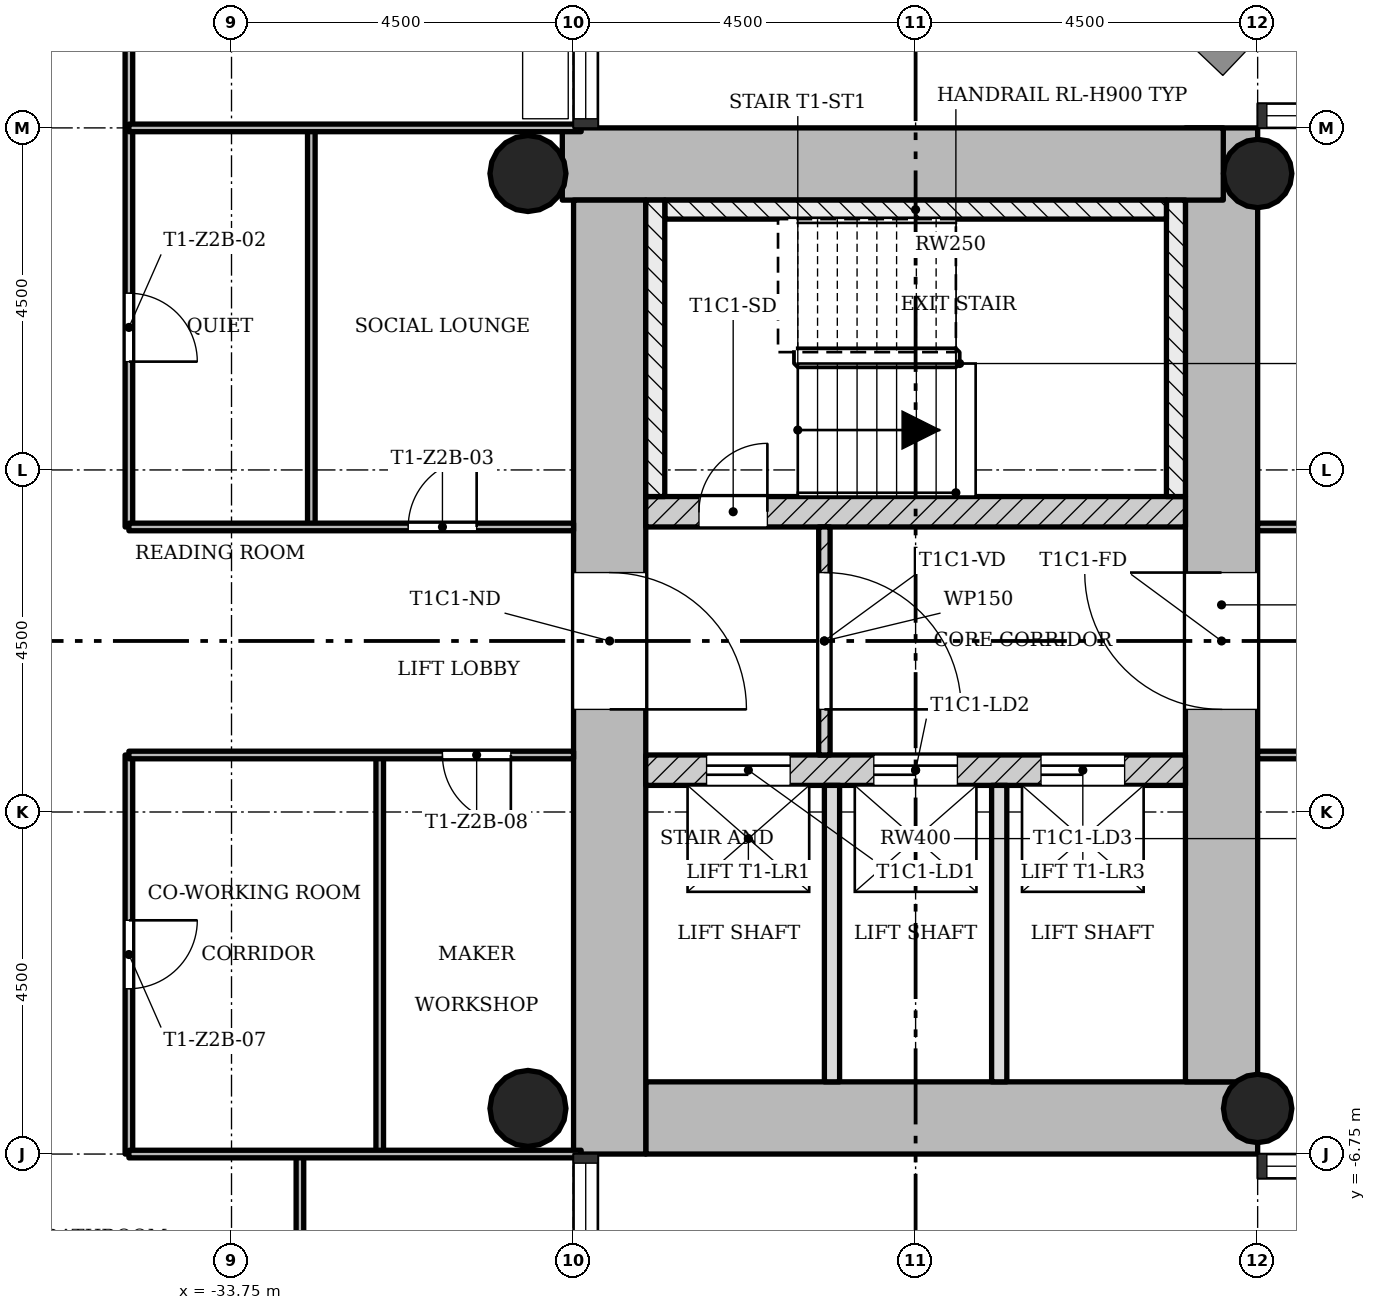
"""IFC4 building model, lengths in metres.
Left out: names, types, materials, properties, quantities, classifications, styles, units other than length and angle.
Written with IfcOpenShell. Run it as: python <this file> out.ifc"""

import sys

from ifc_helpers import new_model, si_unit, direction, frame, frame_2d, origin, origin_2d, place, context, subcontext, project, spatial, rectangle, hollow_circle, extrude, element, fill, save


model = new_model("IFC4")
c1 = context("Model", 3, precision=1e-05, world=origin(), true_north=direction((0.0, 1.0)))
c2 = subcontext(c1, "Body", "Model", "MODEL_VIEW")
j1 = project(units=[si_unit("LENGTHUNIT", "METRE"), si_unit("PLANEANGLEUNIT", "RADIAN")], contexts=[c1])
p1 = place(None, origin())
s1 = spatial("IfcSite", under=j1, at=p1, CompositionType="ELEMENT")
p2 = place(p1, origin())
s2 = spatial("IfcBuilding", under=s1, at=p2, CompositionType="ELEMENT")
p3 = place(p2, frame((0.0, 0.0, 80.0)))
s3 = spatial("IfcBuildingStorey", under=s2, at=p3, CompositionType="ELEMENT", Elevation=80.0)
p4 = place(p3, frame((-28.3, -6.275, 0.0), z_axis=(0.0, 0.0, 1.0), x_axis=(1.0, 0.0, 0.0)))
e1 = element("IfcWall", 1, at=p4, inside=s3, PredefinedType="SHEAR", context=c2, shape_type="SweptSolid", body=[
    extrude(rectangle(XDim=8.05, YDim=0.95, at=frame_2d((4.025, 0.0))), origin(), (0.0, 0.0, 1.0), 3.4),
])
p5 = place(p3, frame((-20.725, -5.8, 0.0), z_axis=(0.0, 0.0, 1.0), x_axis=(0.0, 1.0, 0.0)))
e2 = element("IfcWall", 2, at=p5, inside=s3, PredefinedType="SHEAR", context=c2, shape_type="SweptSolid", body=[
    extrude(rectangle(XDim=12.55, YDim=0.95, at=frame_2d((6.275, 0.0))), origin(), (0.0, 0.0, 1.0), 3.4),
])
p6 = place(p5, frame((4.9, 0.0, 0.0)))
e3 = element("IfcOpeningElement", 3, at=p6, cuts=e2, PredefinedType="OPENING", context=c2, shape_type="SweptSolid", body=[
    extrude(rectangle(XDim=1.8, YDim=2.1, at=frame_2d((0.9, 1.05))), frame((0.0, 0.485, 0.0), z_axis=(0.0, -1.0, 0.0), x_axis=(1.0, 0.0, 0.0)), (0.0, 0.0, 1.0), 0.97),
])
p7 = place(p3, frame((-20.702, 6.275, 0.0), z_axis=(0.0, 0.0, 1.0), x_axis=(-1.0, 0.0, 0.0)))
e4 = element("IfcWall", 4, at=p7, inside=s3, PredefinedType="SHEAR", context=c2, shape_type="SweptSolid", body=[
    extrude(rectangle(XDim=8.696, YDim=0.95, at=frame_2d((4.348, 0.0))), origin(), (0.0, 0.0, 1.0), 3.4),
])
p8 = place(p3, frame((-28.775, 5.8, 0.0), z_axis=(0.0, 0.0, 1.0), x_axis=(0.0, -1.0, 0.0)))
e5 = element("IfcWall", 5, at=p8, inside=s3, PredefinedType="SHEAR", context=c2, shape_type="SweptSolid", body=[
    extrude(rectangle(XDim=12.55, YDim=0.95, at=frame_2d((6.275, 0.0))), origin(), (0.0, 0.0, 1.0), 3.4),
])
p9 = place(p8, frame((4.9, 0.0, 0.0)))
e6 = element("IfcOpeningElement", 6, at=p9, cuts=e5, PredefinedType="OPENING", context=c2, shape_type="SweptSolid", body=[
    extrude(rectangle(XDim=1.8, YDim=2.1, at=frame_2d((0.9, 1.05))), frame((0.0, 0.485, 0.0), z_axis=(0.0, -1.0, 0.0), x_axis=(1.0, 0.0, 0.0)), (0.0, 0.0, 1.0), 0.97),
])
p10 = place(p3, frame((-28.3, -1.7, 0.0), z_axis=(0.0, 0.0, 1.0), x_axis=(1.0, 0.0, 0.0)))
e7 = element("IfcWall", 7, at=p10, inside=s3, PredefinedType="SHEAR", context=c2, shape_type="SweptSolid", body=[
    extrude(rectangle(XDim=7.1, YDim=0.4, at=frame_2d((3.55, 0.0))), origin(), (0.0, 0.0, 1.0), 3.4),
])
p11 = place(p10, frame((0.8, 0.0, 0.0)))
e8 = element("IfcOpeningElement", 8, at=p11, cuts=e7, PredefinedType="OPENING", context=c2, shape_type="SweptSolid", body=[
    extrude(rectangle(XDim=1.1, YDim=2.1, at=frame_2d((0.55, 1.05))), frame((0.0, 0.21, 0.0), z_axis=(0.0, -1.0, 0.0), x_axis=(1.0, 0.0, 0.0)), (0.0, 0.0, 1.0), 0.42),
])
p12 = place(p10, frame((3.0, 0.0, 0.0)))
e9 = element("IfcOpeningElement", 9, at=p12, cuts=e7, PredefinedType="OPENING", context=c2, shape_type="SweptSolid", body=[
    extrude(rectangle(XDim=1.1, YDim=2.1, at=frame_2d((0.55, 1.05))), frame((0.0, 0.21, 0.0), z_axis=(0.0, -1.0, 0.0), x_axis=(1.0, 0.0, 0.0)), (0.0, 0.0, 1.0), 0.42),
])
p13 = place(p10, frame((5.2, 0.0, 0.0)))
e10 = element("IfcOpeningElement", 10, at=p13, cuts=e7, PredefinedType="OPENING", context=c2, shape_type="SweptSolid", body=[
    extrude(rectangle(XDim=1.1, YDim=2.1, at=frame_2d((0.55, 1.05))), frame((0.0, 0.21, 0.0), z_axis=(0.0, -1.0, 0.0), x_axis=(1.0, 0.0, 0.0)), (0.0, 0.0, 1.0), 0.42),
])
p14 = place(p3, frame((-28.3, 1.7, 0.0), z_axis=(0.0, 0.0, 1.0), x_axis=(1.0, 0.0, 0.0)))
e11 = element("IfcWall", 11, at=p14, inside=s3, PredefinedType="SHEAR", context=c2, shape_type="SweptSolid", body=[
    extrude(rectangle(XDim=7.1, YDim=0.4, at=frame_2d((3.55, 0.0))), origin(), (0.0, 0.0, 1.0), 3.4),
])
p15 = place(p14, frame((0.7, 0.0, 0.0)))
e12 = element("IfcOpeningElement", 12, at=p15, cuts=e11, PredefinedType="OPENING", context=c2, shape_type="SweptSolid", body=[
    extrude(rectangle(XDim=0.9, YDim=2.1, at=frame_2d((0.45, 1.05))), frame((0.0, 0.21, 0.0), z_axis=(0.0, -1.0, 0.0), x_axis=(1.0, 0.0, 0.0)), (0.0, 0.0, 1.0), 0.42),
])
for number, where, z_axis, x_axis in (
    (13, (-20.25, -6.15, 0.0), (0.0, 0.0, 1.0), (1.0, 0.0, 0.0)),
    (14, (-20.25, 6.15, 0.0), (0.0, 0.0, 1.0), (1.0, 0.0, 0.0)),
):
    element("IfcColumn", number, at=place(p3, frame(where, z_axis=z_axis, x_axis=x_axis)), inside=s3, PredefinedType="COLUMN", context=c2, shape_type="SweptSolid", body=[
        extrude(hollow_circle(Radius=0.45, WallThickness=0.032, at=origin_2d()), origin(), (0.0, 0.0, 1.0), 3.4),
    ])
for number, where, z_axis, x_axis in (
    (15, (-29.85, -6.15, 0.0), (0.0, 0.0, 1.0), (1.0, 0.0, 0.0)),
    (16, (-29.85, 6.15, 0.0), (0.0, 0.0, 1.0), (1.0, 0.0, 0.0)),
):
    element("IfcColumn", number, at=place(p3, frame(where, z_axis=z_axis, x_axis=x_axis)), inside=s3, PredefinedType="COLUMN", context=c2, shape_type="SweptSolid", body=[
        extrude(hollow_circle(Radius=0.5, WallThickness=0.036, at=origin_2d()), origin(), (0.0, 0.0, 1.0), 3.4),
    ])
p16 = place(p3, frame((-25.95, -1.5, 0.0), z_axis=(0.0, 0.0, 1.0), x_axis=(0.0, 1.0, 0.0)))
e17 = element("IfcWall", 17, at=p16, inside=s3, PredefinedType="PARTITIONING", context=c2, shape_type="SweptSolid", body=[
    extrude(rectangle(XDim=3.0, YDim=0.15, at=frame_2d((1.5, 0.0))), origin(), (0.0, 0.0, 1.0), 3.0),
])
p17 = place(p16, frame((0.6, 0.0, 0.0)))
e18 = element("IfcOpeningElement", 18, at=p17, cuts=e17, PredefinedType="OPENING", context=c2, shape_type="SweptSolid", body=[
    extrude(rectangle(XDim=1.8, YDim=2.1, at=frame_2d((0.9, 1.05))), frame((0.0, 0.085, 0.0), z_axis=(0.0, -1.0, 0.0), x_axis=(1.0, 0.0, 0.0)), (0.0, 0.0, 1.0), 0.17),
])
for number, where, z_axis, x_axis in (
    (19, (-25.85, -5.8, 0.0), (0.0, 0.0, 1.0), (0.0, 1.0, 0.0)),
    (20, (-23.65, -5.8, 0.0), (0.0, 0.0, 1.0), (0.0, 1.0, 0.0)),
):
    element("IfcWall", number, at=place(p3, frame(where, z_axis=z_axis, x_axis=x_axis)), inside=s3, PredefinedType="SOLIDWALL", context=c2, shape_type="SweptSolid", body=[
        extrude(rectangle(XDim=3.9, YDim=0.2, at=frame_2d((1.95, 0.0))), origin(), (0.0, 0.0, 1.0), 3.0),
    ])
p18 = place(p3, frame((-35.1, -6.75, 0.0), z_axis=(0.0, 0.0, 1.0), x_axis=(0.0, 1.0, 0.0)))
e21 = element("IfcWall", 21, at=p18, inside=s3, PredefinedType="PARTITIONING", context=c2, shape_type="SweptSolid", body=[
    extrude(rectangle(XDim=5.25, YDim=0.1, at=frame_2d((2.625, 0.0))), origin(), (0.0, 0.0, 1.0), 3.0),
])
p19 = place(p18, frame((2.175, 0.0, 0.0)))
e22 = element("IfcOpeningElement", 22, at=p19, cuts=e21, PredefinedType="OPENING", context=c2, shape_type="SweptSolid", body=[
    extrude(rectangle(XDim=0.9, YDim=2.1, at=frame_2d((0.45, 1.05))), frame((0.0, 0.06, 0.0), z_axis=(0.0, -1.0, 0.0), x_axis=(1.0, 0.0, 0.0)), (0.0, 0.0, 1.0), 0.12),
])
p20 = place(p3, frame((-35.1, 1.5, 0.0), z_axis=(0.0, 0.0, 1.0), x_axis=(0.0, 1.0, 0.0)))
e23 = element("IfcWall", 23, at=p20, inside=s3, PredefinedType="PARTITIONING", context=c2, shape_type="SweptSolid", body=[
    extrude(rectangle(XDim=9.75, YDim=0.1, at=frame_2d((4.875, 0.0))), origin(), (0.0, 0.0, 1.0), 3.0),
])
p21 = place(p20, frame((2.175, 0.0, 0.0)))
e24 = element("IfcOpeningElement", 24, at=p21, cuts=e23, PredefinedType="OPENING", context=c2, shape_type="SweptSolid", body=[
    extrude(rectangle(XDim=0.9, YDim=2.1, at=frame_2d((0.45, 1.05))), frame((0.0, 0.06, 0.0), z_axis=(0.0, -1.0, 0.0), x_axis=(1.0, 0.0, 0.0)), (0.0, 0.0, 1.0), 0.12),
])
p22 = place(p20, frame((7.05, 0.0, 0.0)))
e25 = element("IfcOpeningElement", 25, at=p22, cuts=e23, PredefinedType="OPENING", context=c2, shape_type="SweptSolid", body=[
    extrude(rectangle(XDim=0.9, YDim=2.1, at=frame_2d((0.45, 1.05))), frame((0.0, 0.06, 0.0), z_axis=(0.0, -1.0, 0.0), x_axis=(1.0, 0.0, 0.0)), (0.0, 0.0, 1.0), 0.12),
])
p23 = place(p3, frame((-32.85, -15.75, 0.0), z_axis=(0.0, 0.0, 1.0), x_axis=(0.0, 1.0, 0.0)))
e26 = element("IfcWall", 26, at=p23, inside=s3, PredefinedType="PARTITIONING", context=c2, shape_type="SweptSolid", body=[
    extrude(rectangle(XDim=9.0, YDim=0.1, at=frame_2d((4.5, 0.0))), origin(), (0.0, 0.0, 1.0), 3.0),
])
p24 = place(p23, frame((5.55, 0.0, 0.0)))
e27 = element("IfcOpeningElement", 27, at=p24, cuts=e26, PredefinedType="OPENING", context=c2, shape_type="SweptSolid", body=[
    extrude(rectangle(XDim=0.9, YDim=2.1, at=frame_2d((0.45, 1.05))), frame((0.0, 0.06, 0.0), z_axis=(0.0, -1.0, 0.0), x_axis=(1.0, 0.0, 0.0)), (0.0, 0.0, 1.0), 0.12),
])
for number, where, z_axis, x_axis in (
    (28, (-32.7, 1.5, 0.0), (0.0, 0.0, 1.0), (0.0, 1.0, 0.0)),
    (29, (-31.8, -6.75, 0.0), (0.0, 0.0, 1.0), (0.0, 1.0, 0.0)),
):
    element("IfcWall", number, at=place(p3, frame(where, z_axis=z_axis, x_axis=x_axis)), inside=s3, PredefinedType="PARTITIONING", context=c2, shape_type="SweptSolid", body=[
        extrude(rectangle(XDim=5.25, YDim=0.1, at=frame_2d((2.625, 0.0))), origin(), (0.0, 0.0, 1.0), 3.0),
    ])
p25 = place(p3, frame((-35.1, -6.75, 0.0), z_axis=(0.0, 0.0, 1.0), x_axis=(1.0, 0.0, 0.0)))
e30 = element("IfcWall", 30, at=p25, inside=s3, PredefinedType="PARTITIONING", context=c2, shape_type="SweptSolid", body=[
    extrude(rectangle(XDim=5.95, YDim=0.1, at=frame_2d((2.975, 0.0))), origin(), (0.0, 0.0, 1.0), 3.0),
])
p26 = place(p3, frame((-35.1, -1.5, 0.0), z_axis=(0.0, 0.0, 1.0), x_axis=(1.0, 0.0, 0.0)))
e31 = element("IfcWall", 31, at=p26, inside=s3, PredefinedType="PARTITIONING", context=c2, shape_type="SweptSolid", body=[
    extrude(rectangle(XDim=5.85, YDim=0.1, at=frame_2d((2.925, 0.0))), origin(), (0.0, 0.0, 1.0), 3.0),
])
p27 = place(p26, frame((4.125, 0.0, 0.0)))
e32 = element("IfcOpeningElement", 32, at=p27, cuts=e31, PredefinedType="OPENING", context=c2, shape_type="SweptSolid", body=[
    extrude(rectangle(XDim=0.9, YDim=2.1, at=frame_2d((0.45, 1.05))), frame((0.0, 0.06, 0.0), z_axis=(0.0, -1.0, 0.0), x_axis=(1.0, 0.0, 0.0)), (0.0, 0.0, 1.0), 0.12),
])
p28 = place(p3, frame((-20.25, -1.5, 0.0), z_axis=(0.0, 0.0, 1.0), x_axis=(1.0, 0.0, 0.0)))
e33 = element("IfcWall", 33, at=p28, inside=s3, PredefinedType="PARTITIONING", context=c2, shape_type="SweptSolid", body=[
    extrude(rectangle(XDim=4.5, YDim=0.1, at=frame_2d((2.25, 0.0))), origin(), (0.0, 0.0, 1.0), 3.0),
])
p29 = place(p28, frame((1.8, 0.0, 0.0)))
e34 = element("IfcOpeningElement", 34, at=p29, cuts=e33, PredefinedType="OPENING", context=c2, shape_type="SweptSolid", body=[
    extrude(rectangle(XDim=0.9, YDim=2.1, at=frame_2d((0.45, 1.05))), frame((0.0, 0.06, 0.0), z_axis=(0.0, -1.0, 0.0), x_axis=(1.0, 0.0, 0.0)), (0.0, 0.0, 1.0), 0.12),
])
p30 = place(p3, frame((-35.1, 1.5, 0.0), z_axis=(0.0, 0.0, 1.0), x_axis=(1.0, 0.0, 0.0)))
e35 = element("IfcWall", 35, at=p30, inside=s3, PredefinedType="PARTITIONING", context=c2, shape_type="SweptSolid", body=[
    extrude(rectangle(XDim=5.85, YDim=0.1, at=frame_2d((2.925, 0.0))), origin(), (0.0, 0.0, 1.0), 3.0),
])
p31 = place(p30, frame((3.675, 0.0, 0.0)))
e36 = element("IfcOpeningElement", 36, at=p31, cuts=e35, PredefinedType="OPENING", context=c2, shape_type="SweptSolid", body=[
    extrude(rectangle(XDim=0.9, YDim=2.1, at=frame_2d((0.45, 1.05))), frame((0.0, 0.06, 0.0), z_axis=(0.0, -1.0, 0.0), x_axis=(1.0, 0.0, 0.0)), (0.0, 0.0, 1.0), 0.12),
])
p32 = place(p3, frame((-20.25, 1.5, 0.0), z_axis=(0.0, 0.0, 1.0), x_axis=(1.0, 0.0, 0.0)))
e37 = element("IfcWall", 37, at=p32, inside=s3, PredefinedType="PARTITIONING", context=c2, shape_type="SweptSolid", body=[
    extrude(rectangle(XDim=4.5, YDim=0.1, at=frame_2d((2.25, 0.0))), origin(), (0.0, 0.0, 1.0), 3.0),
])
p33 = place(p32, frame((1.8, 0.0, 0.0)))
e38 = element("IfcOpeningElement", 38, at=p33, cuts=e37, PredefinedType="OPENING", context=c2, shape_type="SweptSolid", body=[
    extrude(rectangle(XDim=0.9, YDim=2.1, at=frame_2d((0.45, 1.05))), frame((0.0, 0.06, 0.0), z_axis=(0.0, -1.0, 0.0), x_axis=(1.0, 0.0, 0.0)), (0.0, 0.0, 1.0), 0.12),
])
p34 = place(p3, frame((-35.1, 6.75, 0.0), z_axis=(0.0, 0.0, 1.0), x_axis=(1.0, 0.0, 0.0)))
e39 = element("IfcWall", 39, at=p34, inside=s3, PredefinedType="PARTITIONING", context=c2, shape_type="SweptSolid", body=[
    extrude(rectangle(XDim=5.95, YDim=0.1, at=frame_2d((2.975, 0.0))), origin(), (0.0, 0.0, 1.0), 3.0),
])
p35 = place(p3, frame((-21.325, 1.9, 0.0), z_axis=(0.0, 0.0, 1.0), x_axis=(0.0, 1.0, 0.0)))
e40 = element("IfcWall", 40, at=p35, inside=s3, PredefinedType="SHEAR", context=c2, shape_type="SweptSolid", body=[
    extrude(rectangle(XDim=3.9, YDim=0.25, at=frame_2d((1.95, 0.0))), origin(), (0.0, 0.0, 1.0), 3.4),
])
p36 = place(p3, frame((-28.05, 5.675, 0.0), z_axis=(0.0, 0.0, 1.0), x_axis=(1.0, 0.0, 0.0)))
e41 = element("IfcWall", 41, at=p36, inside=s3, PredefinedType="SHEAR", context=c2, shape_type="SweptSolid", body=[
    extrude(rectangle(XDim=6.6, YDim=0.25, at=frame_2d((3.3, 0.0))), origin(), (0.0, 0.0, 1.0), 3.4),
])
p37 = place(p3, frame((-28.175, 1.9, 0.0), z_axis=(0.0, 0.0, 1.0), x_axis=(0.0, 1.0, 0.0)))
e42 = element("IfcWall", 42, at=p37, inside=s3, PredefinedType="SHEAR", context=c2, shape_type="SweptSolid", body=[
    extrude(rectangle(XDim=3.9, YDim=0.25, at=frame_2d((1.95, 0.0))), origin(), (0.0, 0.0, 1.0), 3.4),
])
p38 = place(p17, origin())
e43 = element("IfcDoor", 43, at=p38, inside=s3, OperationType="SINGLE_SWING_LEFT", PredefinedType="DOOR", context=c2, shape_type="SweptSolid", body=[
    extrude(rectangle(XDim=1.8, YDim=2.1, at=frame_2d((0.9, 1.05))), frame((0.0, 0.025, 0.0), z_axis=(0.0, -1.0, 0.0), x_axis=(1.0, 0.0, 0.0)), (0.0, 0.0, 1.0), 0.05),
])
fill(e18, e43)
p39 = place(p21, origin())
e44 = element("IfcDoor", 44, at=p39, inside=s3, OperationType="SINGLE_SWING_LEFT", PredefinedType="DOOR", context=c2, shape_type="SweptSolid", body=[
    extrude(rectangle(XDim=0.9, YDim=2.1, at=frame_2d((0.45, 1.05))), frame((0.0, 0.025, 0.0), z_axis=(0.0, -1.0, 0.0), x_axis=(1.0, 0.0, 0.0)), (0.0, 0.0, 1.0), 0.05),
])
fill(e24, e44)
p40 = place(p31, origin())
e45 = element("IfcDoor", 45, at=p40, inside=s3, OperationType="SINGLE_SWING_LEFT", PredefinedType="DOOR", context=c2, shape_type="SweptSolid", body=[
    extrude(rectangle(XDim=0.9, YDim=2.1, at=frame_2d((0.45, 1.05))), frame((0.0, 0.025, 0.0), z_axis=(0.0, -1.0, 0.0), x_axis=(1.0, 0.0, 0.0)), (0.0, 0.0, 1.0), 0.05),
])
fill(e36, e45)
p41 = place(p19, origin())
e46 = element("IfcDoor", 46, at=p41, inside=s3, OperationType="SINGLE_SWING_RIGHT", PredefinedType="DOOR", context=c2, shape_type="SweptSolid", body=[
    extrude(rectangle(XDim=0.9, YDim=2.1, at=frame_2d((0.45, 1.05))), frame((0.0, 0.025, 0.0), z_axis=(0.0, -1.0, 0.0), x_axis=(1.0, 0.0, 0.0)), (0.0, 0.0, 1.0), 0.05),
])
fill(e22, e46)
p42 = place(p27, origin())
e47 = element("IfcDoor", 47, at=p42, inside=s3, OperationType="SINGLE_SWING_RIGHT", PredefinedType="DOOR", context=c2, shape_type="SweptSolid", body=[
    extrude(rectangle(XDim=0.9, YDim=2.1, at=frame_2d((0.45, 1.05))), frame((0.0, 0.025, 0.0), z_axis=(0.0, -1.0, 0.0), x_axis=(1.0, 0.0, 0.0)), (0.0, 0.0, 1.0), 0.05),
])
fill(e32, e47)
p43 = place(p15, origin())
e48 = element("IfcDoor", 48, at=p43, inside=s3, OperationType="SINGLE_SWING_LEFT", PredefinedType="DOOR", context=c2, shape_type="SweptSolid", body=[
    extrude(rectangle(XDim=0.9, YDim=2.1, at=frame_2d((0.45, 1.05))), frame((0.0, 0.025, 0.0), z_axis=(0.0, -1.0, 0.0), x_axis=(1.0, 0.0, 0.0)), (0.0, 0.0, 1.0), 0.05),
])
fill(e12, e48)
p44 = place(p11, origin())
e49 = element("IfcDoor", 49, at=p44, inside=s3, OperationType="SLIDING_TO_LEFT", PredefinedType="DOOR", context=c2, shape_type="SweptSolid", body=[
    extrude(rectangle(XDim=1.1, YDim=2.1, at=frame_2d((0.55, 1.05))), frame((0.0, 0.025, 0.0), z_axis=(0.0, -1.0, 0.0), x_axis=(1.0, 0.0, 0.0)), (0.0, 0.0, 1.0), 0.05),
])
fill(e8, e49)
p45 = place(p12, origin())
e50 = element("IfcDoor", 50, at=p45, inside=s3, OperationType="SLIDING_TO_LEFT", PredefinedType="DOOR", context=c2, shape_type="SweptSolid", body=[
    extrude(rectangle(XDim=1.1, YDim=2.1, at=frame_2d((0.55, 1.05))), frame((0.0, 0.025, 0.0), z_axis=(0.0, -1.0, 0.0), x_axis=(1.0, 0.0, 0.0)), (0.0, 0.0, 1.0), 0.05),
])
fill(e9, e50)
p46 = place(p13, origin())
e51 = element("IfcDoor", 51, at=p46, inside=s3, OperationType="SLIDING_TO_LEFT", PredefinedType="DOOR", context=c2, shape_type="SweptSolid", body=[
    extrude(rectangle(XDim=1.1, YDim=2.1, at=frame_2d((0.55, 1.05))), frame((0.0, 0.025, 0.0), z_axis=(0.0, -1.0, 0.0), x_axis=(1.0, 0.0, 0.0)), (0.0, 0.0, 1.0), 0.05),
])
fill(e10, e51)
p47 = place(p9, origin())
e52 = element("IfcDoor", 52, at=p47, inside=s3, OperationType="SINGLE_SWING_LEFT", PredefinedType="DOOR", context=c2, shape_type="SweptSolid", body=[
    extrude(rectangle(XDim=1.8, YDim=2.1, at=frame_2d((0.9, 1.05))), frame((0.0, 0.025, 0.0), z_axis=(0.0, -1.0, 0.0), x_axis=(1.0, 0.0, 0.0)), (0.0, 0.0, 1.0), 0.05),
])
fill(e6, e52)
p48 = place(p6, origin())
e53 = element("IfcDoor", 53, at=p48, inside=s3, OperationType="SINGLE_SWING_LEFT", PredefinedType="DOOR", context=c2, shape_type="SweptSolid", body=[
    extrude(rectangle(XDim=1.8, YDim=2.1, at=frame_2d((0.9, 1.05))), frame((0.0, 0.025, 0.0), z_axis=(0.0, -1.0, 0.0), x_axis=(1.0, 0.0, 0.0)), (0.0, 0.0, 1.0), 0.05),
])
fill(e3, e53)
save(model, sys.argv[1])
